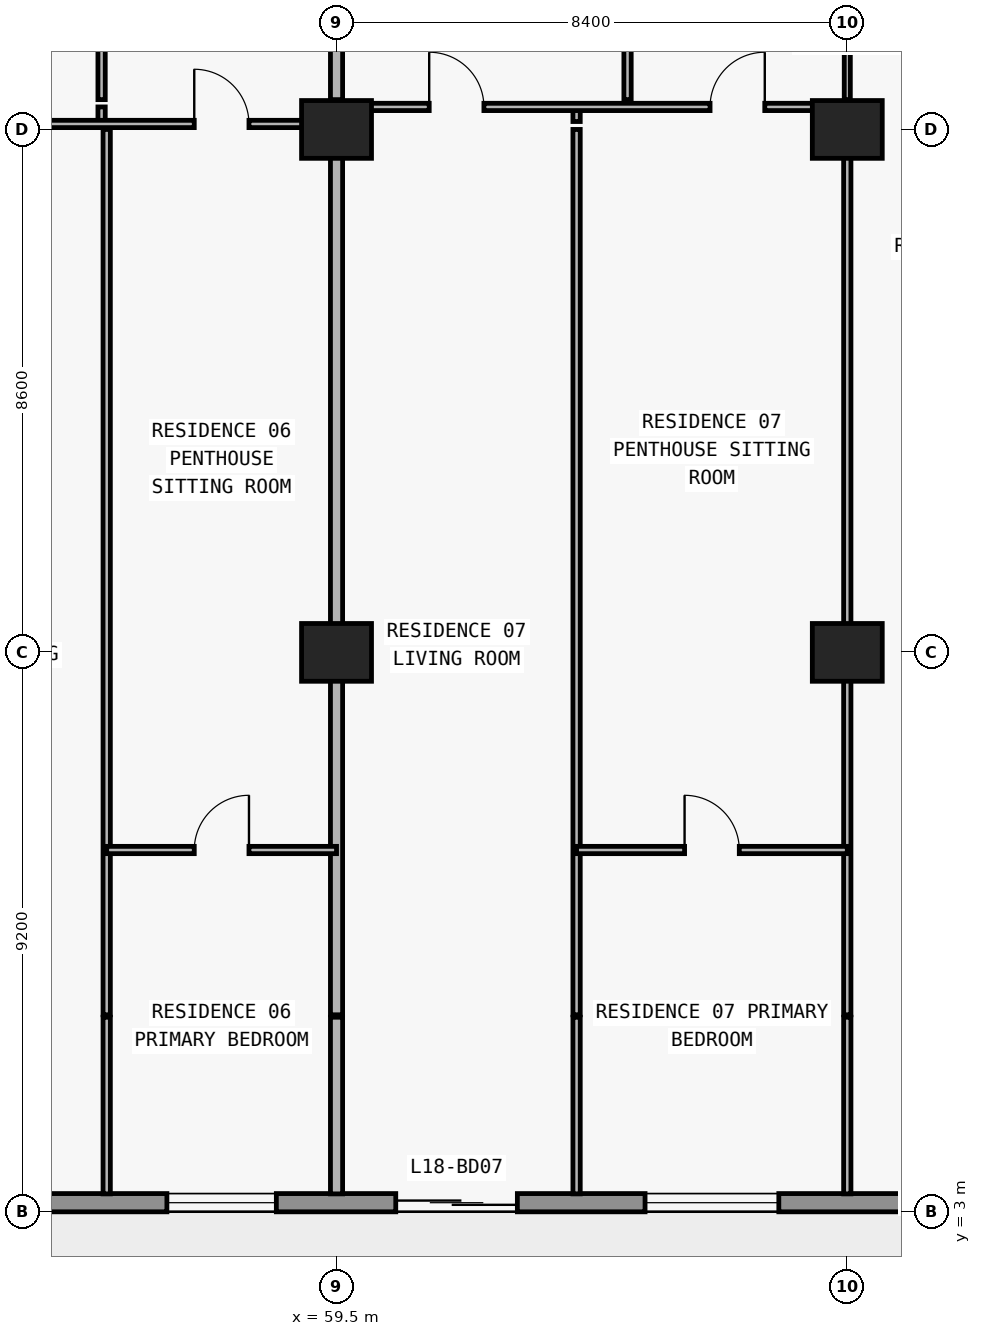
"""IFC4 building model, lengths in metres.
Left out: names, types, materials, properties, quantities, classifications, styles, units other than length and angle.
Written with IfcOpenShell. Run it as: python <this file> out.ifc"""

import sys

from ifc_helpers import new_model, si_unit, direction, frame, frame_2d, origin, origin_2d, place, context, subcontext, project, spatial, rectangle, extrude, element, fill, save


model = new_model("IFC4")
c1 = context("Model", 3, precision=1e-05, world=origin(), true_north=direction((0.0, 1.0)))
c2 = subcontext(c1, "Body", "Model", "MODEL_VIEW")
j1 = project(units=[si_unit("LENGTHUNIT", "METRE"), si_unit("PLANEANGLEUNIT", "RADIAN")], contexts=[c1])
p1 = place(None, origin())
s1 = spatial("IfcSite", under=j1, at=p1, CompositionType="ELEMENT")
p2 = place(p1, origin())
s2 = spatial("IfcBuilding", under=s1, at=p2, CompositionType="ELEMENT")
p3 = place(p2, frame((0.0, 0.0, 69.6)))
s3 = spatial("IfcBuildingStorey", under=s2, at=p3, CompositionType="ELEMENT", Elevation=69.6)
for number, where, z_axis, x_axis in (
    (1, (59.5, 12.2, 0.0), (0.0, 0.0, 1.0), (1.0, 0.0, 0.0)),
    (2, (67.9, 12.2, 0.0), (0.0, 0.0, 1.0), (1.0, 0.0, 0.0)),
    (3, (59.5, 20.8, 0.0), (0.0, 0.0, 1.0), (1.0, 0.0, 0.0)),
    (4, (67.9, 20.8, 0.0), (0.0, 0.0, 1.0), (1.0, 0.0, 0.0)),
):
    element("IfcColumn", number, at=place(p3, frame(where, z_axis=z_axis, x_axis=x_axis)), inside=s3, PredefinedType="COLUMN", context=c2, shape_type="SweptSolid", body=[
        extrude(rectangle(XDim=1.15, YDim=0.95, at=origin_2d()), origin(), (0.0, 0.0, 1.0), 3.05),
    ])
p4 = place(p3, frame((72.7, 3.15, 0.0), z_axis=(0.0, 0.0, 1.0), x_axis=(-1.0, 0.0, 0.0)))
e5 = element("IfcWall", 5, at=p4, inside=s3, PredefinedType="STANDARD", context=c2, shape_type="SweptSolid", body=[
    extrude(rectangle(XDim=67.6, YDim=0.3, at=frame_2d((33.8, 0.0))), origin(), (0.0, 0.0, 1.0), 3.05),
])
p5 = place(p4, frame((59.826, 0.0, 0.0)))
e6 = element("IfcOpeningElement", 6, at=p5, cuts=e5, PredefinedType="OPENING", context=c2, shape_type="SweptSolid", body=[
    extrude(rectangle(XDim=2.0, YDim=2.3, at=frame_2d((1.0, 1.15))), frame((0.0, 0.16, 0.0), z_axis=(0.0, -1.0, 0.0), x_axis=(1.0, 0.0, 0.0)), (0.0, 0.0, 1.0), 0.32),
])
p6 = place(p4, frame((55.526, 0.0, 0.85)))
e7 = element("IfcOpeningElement", 7, at=p6, cuts=e5, PredefinedType="OPENING", context=c2, shape_type="SweptSolid", body=[
    extrude(rectangle(XDim=2.2, YDim=1.55, at=frame_2d((1.1, 0.775))), frame((0.0, 0.16, 0.0), z_axis=(0.0, -1.0, 0.0), x_axis=(1.0, 0.0, 0.0)), (0.0, 0.0, 1.0), 0.32),
])
p7 = place(p4, frame((51.09, 0.0, 0.0)))
e8 = element("IfcOpeningElement", 8, at=p7, cuts=e5, PredefinedType="OPENING", context=c2, shape_type="SweptSolid", body=[
    extrude(rectangle(XDim=2.0, YDim=2.3, at=frame_2d((1.0, 1.15))), frame((0.0, 0.16, 0.0), z_axis=(0.0, -1.0, 0.0), x_axis=(1.0, 0.0, 0.0)), (0.0, 0.0, 1.0), 0.32),
])
p8 = place(p4, frame((46.99, 0.0, 0.85)))
e9 = element("IfcOpeningElement", 9, at=p8, cuts=e5, PredefinedType="OPENING", context=c2, shape_type="SweptSolid", body=[
    extrude(rectangle(XDim=1.8, YDim=1.55, at=frame_2d((0.9, 0.775))), frame((0.0, 0.16, 0.0), z_axis=(0.0, -1.0, 0.0), x_axis=(1.0, 0.0, 0.0)), (0.0, 0.0, 1.0), 0.32),
])
p9 = place(p4, frame((43.026, 0.0, 0.0)))
e10 = element("IfcOpeningElement", 10, at=p9, cuts=e5, PredefinedType="OPENING", context=c2, shape_type="SweptSolid", body=[
    extrude(rectangle(XDim=2.0, YDim=2.3, at=frame_2d((1.0, 1.15))), frame((0.0, 0.16, 0.0), z_axis=(0.0, -1.0, 0.0), x_axis=(1.0, 0.0, 0.0)), (0.0, 0.0, 1.0), 0.32),
])
p10 = place(p4, frame((38.726, 0.0, 0.85)))
e11 = element("IfcOpeningElement", 11, at=p10, cuts=e5, PredefinedType="OPENING", context=c2, shape_type="SweptSolid", body=[
    extrude(rectangle(XDim=2.2, YDim=1.55, at=frame_2d((1.1, 0.775))), frame((0.0, 0.16, 0.0), z_axis=(0.0, -1.0, 0.0), x_axis=(1.0, 0.0, 0.0)), (0.0, 0.0, 1.0), 0.32),
])
p11 = place(p4, frame((34.51, 0.0, 0.0)))
e12 = element("IfcOpeningElement", 12, at=p11, cuts=e5, PredefinedType="OPENING", context=c2, shape_type="SweptSolid", body=[
    extrude(rectangle(XDim=2.0, YDim=2.3, at=frame_2d((1.0, 1.15))), frame((0.0, 0.16, 0.0), z_axis=(0.0, -1.0, 0.0), x_axis=(1.0, 0.0, 0.0)), (0.0, 0.0, 1.0), 0.32),
])
p12 = place(p4, frame((30.81, 0.0, 0.85)))
e13 = element("IfcOpeningElement", 13, at=p12, cuts=e5, PredefinedType="OPENING", context=c2, shape_type="SweptSolid", body=[
    extrude(rectangle(XDim=1.8, YDim=1.55, at=frame_2d((0.9, 0.775))), frame((0.0, 0.16, 0.0), z_axis=(0.0, -1.0, 0.0), x_axis=(1.0, 0.0, 0.0)), (0.0, 0.0, 1.0), 0.32),
])
p13 = place(p4, frame((27.026, 0.0, 0.0)))
e14 = element("IfcOpeningElement", 14, at=p13, cuts=e5, PredefinedType="OPENING", context=c2, shape_type="SweptSolid", body=[
    extrude(rectangle(XDim=2.0, YDim=2.3, at=frame_2d((1.0, 1.15))), frame((0.0, 0.16, 0.0), z_axis=(0.0, -1.0, 0.0), x_axis=(1.0, 0.0, 0.0)), (0.0, 0.0, 1.0), 0.32),
])
p14 = place(p4, frame((22.726, 0.0, 0.85)))
e15 = element("IfcOpeningElement", 15, at=p14, cuts=e5, PredefinedType="OPENING", context=c2, shape_type="SweptSolid", body=[
    extrude(rectangle(XDim=2.2, YDim=1.55, at=frame_2d((1.1, 0.775))), frame((0.0, 0.16, 0.0), z_axis=(0.0, -1.0, 0.0), x_axis=(1.0, 0.0, 0.0)), (0.0, 0.0, 1.0), 0.32),
])
p15 = place(p4, frame((18.29, 0.0, 0.0)))
e16 = element("IfcOpeningElement", 16, at=p15, cuts=e5, PredefinedType="OPENING", context=c2, shape_type="SweptSolid", body=[
    extrude(rectangle(XDim=2.0, YDim=2.3, at=frame_2d((1.0, 1.15))), frame((0.0, 0.16, 0.0), z_axis=(0.0, -1.0, 0.0), x_axis=(1.0, 0.0, 0.0)), (0.0, 0.0, 1.0), 0.32),
])
p16 = place(p4, frame((14.19, 0.0, 0.85)))
e17 = element("IfcOpeningElement", 17, at=p16, cuts=e5, PredefinedType="OPENING", context=c2, shape_type="SweptSolid", body=[
    extrude(rectangle(XDim=1.8, YDim=1.55, at=frame_2d((0.9, 0.775))), frame((0.0, 0.16, 0.0), z_axis=(0.0, -1.0, 0.0), x_axis=(1.0, 0.0, 0.0)), (0.0, 0.0, 1.0), 0.32),
])
p17 = place(p4, frame((10.226, 0.0, 0.0)))
e18 = element("IfcOpeningElement", 18, at=p17, cuts=e5, PredefinedType="OPENING", context=c2, shape_type="SweptSolid", body=[
    extrude(rectangle(XDim=2.0, YDim=2.3, at=frame_2d((1.0, 1.15))), frame((0.0, 0.16, 0.0), z_axis=(0.0, -1.0, 0.0), x_axis=(1.0, 0.0, 0.0)), (0.0, 0.0, 1.0), 0.32),
])
p18 = place(p4, frame((5.926, 0.0, 0.85)))
e19 = element("IfcOpeningElement", 19, at=p18, cuts=e5, PredefinedType="OPENING", context=c2, shape_type="SweptSolid", body=[
    extrude(rectangle(XDim=2.2, YDim=1.55, at=frame_2d((1.1, 0.775))), frame((0.0, 0.16, 0.0), z_axis=(0.0, -1.0, 0.0), x_axis=(1.0, 0.0, 0.0)), (0.0, 0.0, 1.0), 0.32),
])
p19 = place(p3, frame((55.636, 20.93, 0.0), z_axis=(0.0, 0.0, 1.0), x_axis=(0.0, 1.0, 0.0)))
e20 = element("IfcWall", 20, at=p19, inside=s3, PredefinedType="PARTITIONING", context=c2, shape_type="SweptSolid", body=[
    extrude(rectangle(XDim=0.24, YDim=0.12, at=frame_2d((0.12, 0.0))), origin(), (0.0, 0.0, 1.0), 3.05),
])
p20 = place(p3, frame((55.636, 21.29, 0.0), z_axis=(0.0, 0.0, 1.0), x_axis=(0.0, 1.0, 0.0)))
e21 = element("IfcWall", 21, at=p20, inside=s3, PredefinedType="PARTITIONING", context=c2, shape_type="SweptSolid", body=[
    extrude(rectangle(XDim=4.69, YDim=0.12, at=frame_2d((2.345, 0.0))), origin(), (0.0, 0.0, 1.0), 3.05),
])
p21 = place(p20, frame((1.895, 0.0, 0.0)))
e22 = element("IfcOpeningElement", 22, at=p21, cuts=e21, PredefinedType="OPENING", context=c2, shape_type="SweptSolid", body=[
    extrude(rectangle(XDim=0.9, YDim=2.15, at=frame_2d((0.45, 1.075))), frame((0.0, 0.07, 0.0), z_axis=(0.0, -1.0, 0.0), x_axis=(1.0, 0.0, 0.0)), (0.0, 0.0, 1.0), 0.14),
])
p22 = place(p3, frame((55.72, 3.295, 0.0), z_axis=(0.0, 0.0, 1.0), x_axis=(0.0, 1.0, 0.0)))
e23 = element("IfcWall", 23, at=p22, inside=s3, PredefinedType="PARTITIONING", context=c2, shape_type="SweptSolid", body=[
    extrude(rectangle(XDim=2.905, YDim=0.12, at=frame_2d((1.453, 0.0))), origin(), (0.0, 0.0, 1.0), 3.05),
])
p23 = place(p3, frame((55.72, 6.24, 0.0), z_axis=(0.0, 0.0, 1.0), x_axis=(0.0, 1.0, 0.0)))
e24 = element("IfcWall", 24, at=p23, inside=s3, PredefinedType="PARTITIONING", context=c2, shape_type="SweptSolid", body=[
    extrude(rectangle(XDim=14.56, YDim=0.12, at=frame_2d((7.28, 0.0))), origin(), (0.0, 0.0, 1.0), 3.05),
])
p24 = place(p3, frame((59.5, 3.295, 0.0), z_axis=(0.0, 0.0, 1.0), x_axis=(0.0, 1.0, 0.0)))
e25 = element("IfcWall", 25, at=p24, inside=s3, PredefinedType="PARTITIONING", context=c2, shape_type="SweptSolid", body=[
    extrude(rectangle(XDim=2.905, YDim=0.2, at=frame_2d((1.453, 0.0))), origin(), (0.0, 0.0, 1.0), 3.05),
])
p25 = place(p3, frame((59.5, 6.24, 0.0), z_axis=(0.0, 0.0, 1.0), x_axis=(0.0, 1.0, 0.0)))
e26 = element("IfcWall", 26, at=p25, inside=s3, PredefinedType="PARTITIONING", context=c2, shape_type="SweptSolid", body=[
    extrude(rectangle(XDim=14.56, YDim=0.2, at=frame_2d((7.28, 0.0))), origin(), (0.0, 0.0, 1.0), 2.11),
])
p26 = place(p3, frame((59.5, 20.93, 0.0), z_axis=(0.0, 0.0, 1.0), x_axis=(0.0, 1.0, 0.0)))
e27 = element("IfcWall", 27, at=p26, inside=s3, PredefinedType="PARTITIONING", context=c2, shape_type="SweptSolid", body=[
    extrude(rectangle(XDim=0.24, YDim=0.2, at=frame_2d((0.12, 0.0))), origin(), (0.0, 0.0, 1.0), 3.05),
])
p27 = place(p3, frame((59.5, 21.29, 0.0), z_axis=(0.0, 0.0, 1.0), x_axis=(0.0, 1.0, 0.0)))
e28 = element("IfcWall", 28, at=p27, inside=s3, PredefinedType="PARTITIONING", context=c2, shape_type="SweptSolid", body=[
    extrude(rectangle(XDim=4.69, YDim=0.2, at=frame_2d((2.345, 0.0))), origin(), (0.0, 0.0, 1.0), 2.11),
])
p28 = place(p3, frame((63.448, 3.295, 0.0), z_axis=(0.0, 0.0, 1.0), x_axis=(0.0, 1.0, 0.0)))
e29 = element("IfcWall", 29, at=p28, inside=s3, PredefinedType="PARTITIONING", context=c2, shape_type="SweptSolid", body=[
    extrude(rectangle(XDim=2.905, YDim=0.12, at=frame_2d((1.453, 0.0))), origin(), (0.0, 0.0, 1.0), 3.05),
])
p29 = place(p3, frame((63.448, 6.24, 0.0), z_axis=(0.0, 0.0, 1.0), x_axis=(0.0, 1.0, 0.0)))
e30 = element("IfcWall", 30, at=p29, inside=s3, PredefinedType="PARTITIONING", context=c2, shape_type="SweptSolid", body=[
    extrude(rectangle(XDim=14.56, YDim=0.12, at=frame_2d((7.28, 0.0))), origin(), (0.0, 0.0, 1.0), 3.05),
])
p30 = place(p3, frame((63.448, 20.93, 0.0), z_axis=(0.0, 0.0, 1.0), x_axis=(0.0, 1.0, 0.0)))
e31 = element("IfcWall", 31, at=p30, inside=s3, PredefinedType="PARTITIONING", context=c2, shape_type="SweptSolid", body=[
    extrude(rectangle(XDim=0.24, YDim=0.12, at=frame_2d((0.12, 0.0))), origin(), (0.0, 0.0, 1.0), 3.05),
])
p31 = place(p3, frame((64.286, 21.29, 0.0), z_axis=(0.0, 0.0, 1.0), x_axis=(0.0, 1.0, 0.0)))
e32 = element("IfcWall", 32, at=p31, inside=s3, PredefinedType="PARTITIONING", context=c2, shape_type="SweptSolid", body=[
    extrude(rectangle(XDim=4.69, YDim=0.12, at=frame_2d((2.345, 0.0))), origin(), (0.0, 0.0, 1.0), 3.05),
])
p32 = place(p31, frame((1.895, 0.0, 0.0)))
e33 = element("IfcOpeningElement", 33, at=p32, cuts=e32, PredefinedType="OPENING", context=c2, shape_type="SweptSolid", body=[
    extrude(rectangle(XDim=0.9, YDim=2.15, at=frame_2d((0.45, 1.075))), frame((0.0, 0.07, 0.0), z_axis=(0.0, -1.0, 0.0), x_axis=(1.0, 0.0, 0.0)), (0.0, 0.0, 1.0), 0.14),
])
p33 = place(p3, frame((67.9, 3.295, 0.0), z_axis=(0.0, 0.0, 1.0), x_axis=(0.0, 1.0, 0.0)))
e34 = element("IfcWall", 34, at=p33, inside=s3, PredefinedType="PARTITIONING", context=c2, shape_type="SweptSolid", body=[
    extrude(rectangle(XDim=2.905, YDim=0.12, at=frame_2d((1.453, 0.0))), origin(), (0.0, 0.0, 1.0), 3.05),
])
p34 = place(p3, frame((67.9, 6.24, 0.0), z_axis=(0.0, 0.0, 1.0), x_axis=(0.0, 1.0, 0.0)))
e35 = element("IfcWall", 35, at=p34, inside=s3, PredefinedType="PARTITIONING", context=c2, shape_type="SweptSolid", body=[
    extrude(rectangle(XDim=14.56, YDim=0.12, at=frame_2d((7.28, 0.0))), origin(), (0.0, 0.0, 1.0), 2.11),
])
p35 = place(p3, frame((67.9, 20.93, 0.0), z_axis=(0.0, 0.0, 1.0), x_axis=(0.0, 1.0, 0.0)))
e36 = element("IfcWall", 36, at=p35, inside=s3, PredefinedType="PARTITIONING", context=c2, shape_type="SweptSolid", body=[
    extrude(rectangle(XDim=0.24, YDim=0.12, at=frame_2d((0.12, 0.0))), origin(), (0.0, 0.0, 1.0), 3.05),
])
p36 = place(p3, frame((67.9, 21.29, 0.0), z_axis=(0.0, 0.0, 1.0), x_axis=(0.0, 1.0, 0.0)))
e37 = element("IfcWall", 37, at=p36, inside=s3, PredefinedType="MOVABLE", context=c2, shape_type="SweptSolid", body=[
    extrude(rectangle(XDim=4.69, YDim=0.1, at=frame_2d((2.345, 0.0))), origin(), (0.0, 0.0, 1.0), 2.11),
])
p37 = place(p36, frame((1.895, 0.0, 0.0)))
e38 = element("IfcOpeningElement", 38, at=p37, cuts=e37, PredefinedType="OPENING", context=c2, shape_type="SweptSolid", body=[
    extrude(rectangle(XDim=0.9, YDim=2.06, at=frame_2d((0.45, 1.03))), frame((0.0, 0.06, 0.0), z_axis=(0.0, -1.0, 0.0), x_axis=(1.0, 0.0, 0.0)), (0.0, 0.0, 1.0), 0.12),
])
p38 = place(p3, frame((55.72, 8.95, 0.0), z_axis=(0.0, 0.0, 1.0), x_axis=(1.0, 0.0, 0.0)))
e39 = element("IfcWall", 39, at=p38, inside=s3, PredefinedType="PARTITIONING", context=c2, shape_type="SweptSolid", body=[
    extrude(rectangle(XDim=3.78, YDim=0.12, at=frame_2d((1.89, 0.0))), origin(), (0.0, 0.0, 1.0), 3.05),
])
p39 = place(p38, frame((1.44, 0.0, 0.0)))
e40 = element("IfcOpeningElement", 40, at=p39, cuts=e39, PredefinedType="OPENING", context=c2, shape_type="SweptSolid", body=[
    extrude(rectangle(XDim=0.9, YDim=2.15, at=frame_2d((0.45, 1.075))), frame((0.0, 0.07, 0.0), z_axis=(0.0, -1.0, 0.0), x_axis=(1.0, 0.0, 0.0)), (0.0, 0.0, 1.0), 0.14),
])
p40 = place(p3, frame((63.448, 8.95, 0.0), z_axis=(0.0, 0.0, 1.0), x_axis=(1.0, 0.0, 0.0)))
e41 = element("IfcWall", 41, at=p40, inside=s3, PredefinedType="PARTITIONING", context=c2, shape_type="SweptSolid", body=[
    extrude(rectangle(XDim=4.452, YDim=0.12, at=frame_2d((2.226, 0.0))), origin(), (0.0, 0.0, 1.0), 3.05),
])
p41 = place(p40, frame((1.776, 0.0, 0.0)))
e42 = element("IfcOpeningElement", 42, at=p41, cuts=e41, PredefinedType="OPENING", context=c2, shape_type="SweptSolid", body=[
    extrude(rectangle(XDim=0.9, YDim=2.15, at=frame_2d((0.45, 1.075))), frame((0.0, 0.07, 0.0), z_axis=(0.0, -1.0, 0.0), x_axis=(1.0, 0.0, 0.0)), (0.0, 0.0, 1.0), 0.14),
])
p42 = place(p3, frame((51.37, 20.89, 0.0), z_axis=(0.0, 0.0, 1.0), x_axis=(1.0, 0.0, 0.0)))
e43 = element("IfcWall", 43, at=p42, inside=s3, PredefinedType="PARTITIONING", context=c2, shape_type="SweptSolid", body=[
    extrude(rectangle(XDim=8.13, YDim=0.12, at=frame_2d((4.065, 0.0))), origin(), (0.0, 0.0, 1.0), 2.11),
])
p43 = place(p42, frame((1.683, 0.0, 0.0)))
e44 = element("IfcOpeningElement", 44, at=p43, cuts=e43, PredefinedType="OPENING", context=c2, shape_type="SweptSolid", body=[
    extrude(rectangle(XDim=0.9, YDim=2.06, at=frame_2d((0.45, 1.03))), frame((0.0, 0.07, 0.0), z_axis=(0.0, -1.0, 0.0), x_axis=(1.0, 0.0, 0.0)), (0.0, 0.0, 1.0), 0.14),
])
p44 = place(p42, frame((5.79, 0.0, 0.0)))
e45 = element("IfcOpeningElement", 45, at=p44, cuts=e43, PredefinedType="OPENING", context=c2, shape_type="SweptSolid", body=[
    extrude(rectangle(XDim=0.9, YDim=2.06, at=frame_2d((0.45, 1.03))), frame((0.0, 0.07, 0.0), z_axis=(0.0, -1.0, 0.0), x_axis=(1.0, 0.0, 0.0)), (0.0, 0.0, 1.0), 0.14),
])
p45 = place(p3, frame((59.5, 21.17, 0.0), z_axis=(0.0, 0.0, 1.0), x_axis=(1.0, 0.0, 0.0)))
e46 = element("IfcWall", 46, at=p45, inside=s3, PredefinedType="PARTITIONING", context=c2, shape_type="SweptSolid", body=[
    extrude(rectangle(XDim=8.4, YDim=0.12, at=frame_2d((4.2, 0.0))), origin(), (0.0, 0.0, 1.0), 3.05),
])
p46 = place(p45, frame((1.524, 0.0, 0.0)))
e47 = element("IfcOpeningElement", 47, at=p46, cuts=e46, PredefinedType="OPENING", context=c2, shape_type="SweptSolid", body=[
    extrude(rectangle(XDim=0.9, YDim=2.15, at=frame_2d((0.45, 1.075))), frame((0.0, 0.07, 0.0), z_axis=(0.0, -1.0, 0.0), x_axis=(1.0, 0.0, 0.0)), (0.0, 0.0, 1.0), 0.14),
])
p47 = place(p45, frame((6.143, 0.0, 0.0)))
e48 = element("IfcOpeningElement", 48, at=p47, cuts=e46, PredefinedType="OPENING", context=c2, shape_type="SweptSolid", body=[
    extrude(rectangle(XDim=0.9, YDim=2.15, at=frame_2d((0.45, 1.075))), frame((0.0, 0.07, 0.0), z_axis=(0.0, -1.0, 0.0), x_axis=(1.0, 0.0, 0.0)), (0.0, 0.0, 1.0), 0.14),
])
p48 = place(p16, origin())
e49 = element("IfcWindow", 49, at=p48, inside=s3, PartitioningType="SINGLE_PANEL", PredefinedType="WINDOW", context=c2, shape_type="SweptSolid", body=[
    extrude(rectangle(XDim=1.8, YDim=1.55, at=frame_2d((0.9, 0.775))), frame((0.0, 0.03, 0.0), z_axis=(0.0, -1.0, 0.0), x_axis=(1.0, 0.0, 0.0)), (0.0, 0.0, 1.0), 0.06),
])
fill(e17, e49)
p49 = place(p17, origin())
e50 = element("IfcDoor", 50, at=p49, inside=s3, OperationType="DOUBLE_DOOR_SLIDING", PredefinedType="DOOR", context=c2, shape_type="SweptSolid", body=[
    extrude(rectangle(XDim=2.0, YDim=2.3, at=frame_2d((1.0, 1.15))), frame((0.0, 0.025, 0.0), z_axis=(0.0, -1.0, 0.0), x_axis=(1.0, 0.0, 0.0)), (0.0, 0.0, 1.0), 0.05),
])
fill(e18, e50)
p50 = place(p18, origin())
e51 = element("IfcWindow", 51, at=p50, inside=s3, PartitioningType="SINGLE_PANEL", PredefinedType="WINDOW", context=c2, shape_type="SweptSolid", body=[
    extrude(rectangle(XDim=2.2, YDim=1.55, at=frame_2d((1.1, 0.775))), frame((0.0, 0.03, 0.0), z_axis=(0.0, -1.0, 0.0), x_axis=(1.0, 0.0, 0.0)), (0.0, 0.0, 1.0), 0.06),
])
fill(e19, e51)
p51 = place(p44, origin())
e52 = element("IfcDoor", 52, at=p51, inside=s3, OperationType="SINGLE_SWING_LEFT", PredefinedType="DOOR", context=c2, shape_type="SweptSolid", body=[
    extrude(rectangle(XDim=0.9, YDim=2.06, at=frame_2d((0.45, 1.03))), frame((0.0, 0.025, 0.0), z_axis=(0.0, -1.0, 0.0), x_axis=(1.0, 0.0, 0.0)), (0.0, 0.0, 1.0), 0.05),
])
fill(e45, e52)
p52 = place(p39, origin())
e53 = element("IfcDoor", 53, at=p52, inside=s3, OperationType="SINGLE_SWING_RIGHT", PredefinedType="DOOR", context=c2, shape_type="SweptSolid", body=[
    extrude(rectangle(XDim=0.9, YDim=2.15, at=frame_2d((0.45, 1.075))), frame((0.0, 0.025, 0.0), z_axis=(0.0, -1.0, 0.0), x_axis=(1.0, 0.0, 0.0)), (0.0, 0.0, 1.0), 0.05),
])
fill(e40, e53)
p53 = place(p46, origin())
e54 = element("IfcDoor", 54, at=p53, inside=s3, OperationType="SINGLE_SWING_LEFT", PredefinedType="DOOR", context=c2, shape_type="SweptSolid", body=[
    extrude(rectangle(XDim=0.9, YDim=2.15, at=frame_2d((0.45, 1.075))), frame((0.0, 0.025, 0.0), z_axis=(0.0, -1.0, 0.0), x_axis=(1.0, 0.0, 0.0)), (0.0, 0.0, 1.0), 0.05),
])
fill(e47, e54)
p54 = place(p47, origin())
e55 = element("IfcDoor", 55, at=p54, inside=s3, OperationType="SINGLE_SWING_RIGHT", PredefinedType="DOOR", context=c2, shape_type="SweptSolid", body=[
    extrude(rectangle(XDim=0.9, YDim=2.15, at=frame_2d((0.45, 1.075))), frame((0.0, 0.025, 0.0), z_axis=(0.0, -1.0, 0.0), x_axis=(1.0, 0.0, 0.0)), (0.0, 0.0, 1.0), 0.05),
])
fill(e48, e55)
p55 = place(p41, origin())
e56 = element("IfcDoor", 56, at=p55, inside=s3, OperationType="SINGLE_SWING_LEFT", PredefinedType="DOOR", context=c2, shape_type="SweptSolid", body=[
    extrude(rectangle(XDim=0.9, YDim=2.15, at=frame_2d((0.45, 1.075))), frame((0.0, 0.025, 0.0), z_axis=(0.0, -1.0, 0.0), x_axis=(1.0, 0.0, 0.0)), (0.0, 0.0, 1.0), 0.05),
])
fill(e42, e56)
save(model, sys.argv[1])
